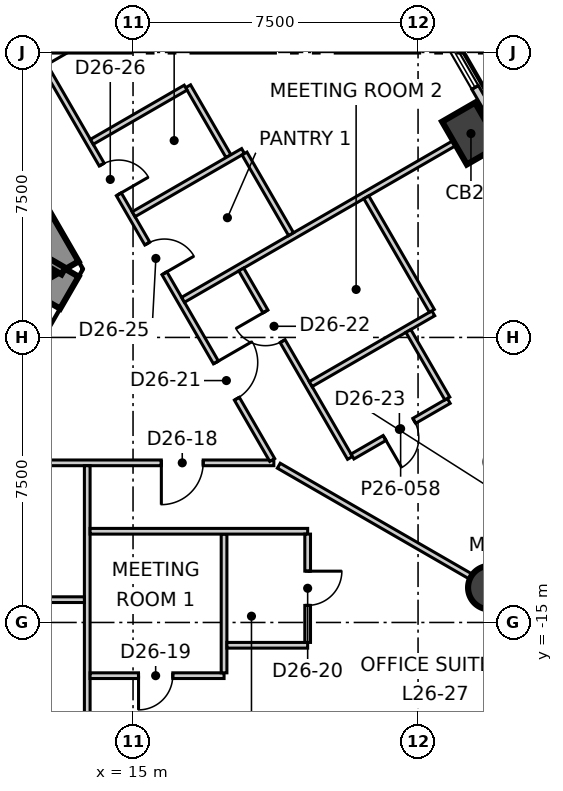
"""IFC4 building model, lengths in metres.
Left out: names, types, materials, properties, quantities, classifications, styles, units other than length and angle.
Written with IfcOpenShell. Run it as: python <this file> out.ifc"""

import sys

from ifc_helpers import new_model, si_unit, direction, frame, frame_2d, origin, origin_2d, place, context, subcontext, project, spatial, polyline, rectangle, circle, outline, extrude, element, fill, save


model = new_model("IFC4")
c1 = context("Model", 3, precision=1e-05, world=origin(), true_north=direction((0.0, 1.0)))
c2 = subcontext(c1, "Body", "Model", "MODEL_VIEW")
j1 = project(units=[si_unit("LENGTHUNIT", "METRE"), si_unit("PLANEANGLEUNIT", "RADIAN")], contexts=[c1])
p1 = place(None, origin())
s1 = spatial("IfcSite", under=j1, at=p1, CompositionType="ELEMENT")
p2 = place(p1, origin())
s2 = spatial("IfcBuilding", under=s1, at=p2, CompositionType="ELEMENT")
p3 = place(p2, frame((0.0, 0.0, 116.3)))
s3 = spatial("IfcBuildingStorey", under=s2, at=p3, CompositionType="ELEMENT", Elevation=116.3)
p4 = place(p3, frame((11.547, -8.6, -0.3), z_axis=(0.0, 0.0, 1.0), x_axis=(0.49987182685, 0.866099391942, 0.0)))
e1 = element("IfcWall", 1, at=p4, inside=s3, PredefinedType="SHEAR", context=c2, shape_type="SweptSolid", body=[
    extrude(outline(polyline([(-0.231, -0.4), (1.674, -0.4), (3.579, -0.4), (3.118, 0.4), (1.674, 0.4), (0.231, 0.4), (-0.231, -0.4)])), origin(), (0.0, 0.0, 1.0), 4.0),
])
p5 = place(p4, frame((0.974, 0.0, 0.3)))
e2 = element("IfcOpeningElement", 2, at=p5, cuts=e1, PredefinedType="OPENING", context=c2, shape_type="SweptSolid", body=[
    extrude(rectangle(XDim=1.4, YDim=2.1, at=frame_2d((0.7, 1.05))), frame((0.0, 0.41, 0.0), z_axis=(0.0, -1.0, 0.0), x_axis=(1.0, 0.0, 0.0)), (0.0, 0.0, 1.0), 0.82),
])
p6 = place(p3, frame((13.221, -5.7, -0.3), z_axis=(0.0, 0.0, 1.0), x_axis=(-0.499995765644, 0.866027848477, 0.0)))
e3 = element("IfcWall", 3, at=p6, inside=s3, PredefinedType="SHEAR", context=c2, shape_type="SweptSolid", body=[
    extrude(outline(polyline([(-0.231, -0.4), (1.732, -0.4), (3.695, -0.4), (5.658, -0.4), (7.621, -0.4), (9.584, -0.4), (11.547, -0.4), (13.51, -0.4), (15.473, -0.4), (17.436, -0.4), (19.399, -0.4), (21.362, -0.4), (23.325, -0.4), (22.863, 0.4), (20.977, 0.4), (19.091, 0.4), (17.205, 0.4), (15.319, 0.4), (13.433, 0.4), (11.547, 0.4), (9.661, 0.4), (7.775, 0.4), (5.889, 0.4), (4.003, 0.4), (2.117, 0.4), (0.231, 0.4), (-0.231, -0.4)])), origin(), (0.0, 0.0, 1.0), 4.0),
])
p7 = place(p6, frame((10.647, 0.0, 0.3)))
e4 = element("IfcOpeningElement", 4, at=p7, cuts=e3, PredefinedType="OPENING", context=c2, shape_type="SweptSolid", body=[
    extrude(rectangle(XDim=1.8, YDim=2.1, at=frame_2d((0.9, 1.05))), frame((0.0, 0.41, 0.0), z_axis=(0.0, -1.0, 0.0), x_axis=(1.0, 0.0, 0.0)), (0.0, 0.0, 1.0), 0.82),
])
p8 = place(p3, frame((23.892, -2.136, -0.3), z_axis=(0.0, 0.0, 1.0), x_axis=(-0.5, 0.866025403784, 0.0)))
e5 = element("IfcColumn", 5, at=p8, inside=s3, PredefinedType="COLUMN", context=c2, shape_type="SweptSolid", body=[
    extrude(rectangle(XDim=1.3, YDim=1.0, at=origin_2d()), origin(), (0.0, 0.0, 1.0), 4.0),
])
p9 = place(p3, frame((24.391, -14.083, -0.3), z_axis=(0.0, 0.0, 1.0), x_axis=(1.0, 0.0, 0.0)))
e6 = element("IfcColumn", 6, at=p9, inside=s3, PredefinedType="COLUMN", context=c2, shape_type="SweptSolid", body=[
    extrude(circle(Radius=0.575, at=origin_2d()), origin(), (0.0, 0.0, 1.0), 4.0),
])
p10 = place(p3, frame((32.048, -14.861, 0.0), z_axis=(0.0, 0.0, 1.0), x_axis=(-0.499996704161, 0.866027306629, 0.0)))
e7 = element("IfcWall", 7, at=p10, inside=s3, PredefinedType="ELEMENTEDWALL", context=c2, shape_type="SweptSolid", body=[
    extrude(rectangle(XDim=57.769, YDim=0.2, at=frame_2d((28.884, 0.0))), origin(), (0.0, 0.0, 1.0), 3.7),
])
p11 = place(p10, frame((2.302, 0.0, 0.9)))
e8 = element("IfcOpeningElement", 8, at=p11, cuts=e7, PredefinedType="OPENING", context=c2, shape_type="SweptSolid", body=[
    extrude(rectangle(XDim=4.9, YDim=2.5, at=frame_2d((2.45, 1.25))), frame((0.0, 0.11, 0.0), z_axis=(0.0, -1.0, 0.0), x_axis=(1.0, 0.0, 0.0)), (0.0, 0.0, 1.0), 0.22),
])
p12 = place(p10, frame((9.199, 0.0, 0.9)))
e9 = element("IfcOpeningElement", 9, at=p12, cuts=e7, PredefinedType="OPENING", context=c2, shape_type="SweptSolid", body=[
    extrude(rectangle(XDim=4.9, YDim=2.5, at=frame_2d((2.45, 1.25))), frame((0.0, 0.11, 0.0), z_axis=(0.0, -1.0, 0.0), x_axis=(1.0, 0.0, 0.0)), (0.0, 0.0, 1.0), 0.22),
])
p13 = place(p10, frame((16.097, 0.0, 0.9)))
e10 = element("IfcOpeningElement", 10, at=p13, cuts=e7, PredefinedType="OPENING", context=c2, shape_type="SweptSolid", body=[
    extrude(rectangle(XDim=4.9, YDim=2.5, at=frame_2d((2.45, 1.25))), frame((0.0, 0.11, 0.0), z_axis=(0.0, -1.0, 0.0), x_axis=(1.0, 0.0, 0.0)), (0.0, 0.0, 1.0), 0.22),
])
p14 = place(p10, frame((22.995, 0.0, 0.9)))
e11 = element("IfcOpeningElement", 11, at=p14, cuts=e7, PredefinedType="OPENING", context=c2, shape_type="SweptSolid", body=[
    extrude(rectangle(XDim=4.9, YDim=2.5, at=frame_2d((2.45, 1.25))), frame((0.0, 0.11, 0.0), z_axis=(0.0, -1.0, 0.0), x_axis=(1.0, 0.0, 0.0)), (0.0, 0.0, 1.0), 0.22),
])
p15 = place(p10, frame((29.893, 0.0, 0.9)))
e12 = element("IfcOpeningElement", 12, at=p15, cuts=e7, PredefinedType="OPENING", context=c2, shape_type="SweptSolid", body=[
    extrude(rectangle(XDim=4.9, YDim=2.5, at=frame_2d((2.45, 1.25))), frame((0.0, 0.11, 0.0), z_axis=(0.0, -1.0, 0.0), x_axis=(1.0, 0.0, 0.0)), (0.0, 0.0, 1.0), 0.22),
])
p16 = place(p10, frame((36.791, 0.0, 0.9)))
e13 = element("IfcOpeningElement", 13, at=p16, cuts=e7, PredefinedType="OPENING", context=c2, shape_type="SweptSolid", body=[
    extrude(rectangle(XDim=4.9, YDim=2.5, at=frame_2d((2.45, 1.25))), frame((0.0, 0.11, 0.0), z_axis=(0.0, -1.0, 0.0), x_axis=(1.0, 0.0, 0.0)), (0.0, 0.0, 1.0), 0.22),
])
p17 = place(p10, frame((43.689, 0.0, 0.9)))
e14 = element("IfcOpeningElement", 14, at=p17, cuts=e7, PredefinedType="OPENING", context=c2, shape_type="SweptSolid", body=[
    extrude(rectangle(XDim=4.9, YDim=2.5, at=frame_2d((2.45, 1.25))), frame((0.0, 0.11, 0.0), z_axis=(0.0, -1.0, 0.0), x_axis=(1.0, 0.0, 0.0)), (0.0, 0.0, 1.0), 0.22),
])
p18 = place(p10, frame((50.587, 0.0, 0.9)))
e15 = element("IfcOpeningElement", 15, at=p18, cuts=e7, PredefinedType="OPENING", context=c2, shape_type="SweptSolid", body=[
    extrude(rectangle(XDim=4.9, YDim=2.5, at=frame_2d((2.45, 1.25))), frame((0.0, 0.11, 0.0), z_axis=(0.0, -1.0, 0.0), x_axis=(1.0, 0.0, 0.0)), (0.0, 0.0, 1.0), 0.22),
])
p19 = place(p3, frame((0.901, -10.8, 0.0), z_axis=(0.0, 0.0, 1.0), x_axis=(1.0, 0.0, 0.0)))
e16 = element("IfcWall", 16, at=p19, inside=s3, PredefinedType="PARTITIONING", context=c2, shape_type="SweptSolid", body=[
    extrude(rectangle(XDim=17.804, YDim=0.15, at=frame_2d((8.902, 0.0))), origin(), (0.0, 0.0, 1.0), 3.7),
])
p20 = place(p19, frame((5.849, 0.0, 0.0)))
e17 = element("IfcOpeningElement", 17, at=p20, cuts=e16, PredefinedType="OPENING", context=c2, shape_type="SweptSolid", body=[
    extrude(rectangle(XDim=1.1, YDim=2.1, at=frame_2d((0.55, 1.05))), frame((0.0, 0.085, 0.0), z_axis=(0.0, -1.0, 0.0), x_axis=(1.0, 0.0, 0.0)), (0.0, 0.0, 1.0), 0.17),
])
p21 = place(p19, frame((14.844, 0.0, 0.0)))
e18 = element("IfcOpeningElement", 18, at=p21, cuts=e16, PredefinedType="OPENING", context=c2, shape_type="SweptSolid", body=[
    extrude(rectangle(XDim=1.1, YDim=2.1, at=frame_2d((0.55, 1.05))), frame((0.0, 0.085, 0.0), z_axis=(0.0, -1.0, 0.0), x_axis=(1.0, 0.0, 0.0)), (0.0, 0.0, 1.0), 0.17),
])
p22 = place(p3, frame((9.803, 4.62, 0.0), z_axis=(0.0, 0.0, 1.0), x_axis=(0.500023004316, -0.866012121829, 0.0)))
e19 = element("IfcWall", 19, at=p22, inside=s3, PredefinedType="PARTITIONING", context=c2, shape_type="SweptSolid", body=[
    extrude(rectangle(XDim=17.719, YDim=0.15, at=frame_2d((8.86, 0.0))), origin(), (0.0, 0.0, 1.0), 3.7),
])
p23 = place(p22, frame((14.756, 0.0, 0.0)))
e20 = element("IfcOpeningElement", 20, at=p23, cuts=e19, PredefinedType="OPENING", context=c2, shape_type="SweptSolid", body=[
    extrude(rectangle(XDim=1.1, YDim=2.1, at=frame_2d((0.55, 1.05))), frame((0.0, 0.085, 0.0), z_axis=(0.0, -1.0, 0.0), x_axis=(1.0, 0.0, 0.0)), (0.0, 0.0, 1.0), 0.17),
])
p24 = place(p22, frame((4.645, 0.0, 0.0)))
e21 = element("IfcOpeningElement", 21, at=p24, cuts=e19, PredefinedType="OPENING", context=c2, shape_type="SweptSolid", body=[
    extrude(rectangle(XDim=1.1, YDim=2.1, at=frame_2d((0.55, 1.05))), frame((0.0, 0.085, 0.0), z_axis=(0.0, -1.0, 0.0), x_axis=(1.0, 0.0, 0.0)), (0.0, 0.0, 1.0), 0.17),
])
p25 = place(p22, frame((11.145, 0.0, 0.0)))
e22 = element("IfcOpeningElement", 22, at=p25, cuts=e19, PredefinedType="OPENING", context=c2, shape_type="SweptSolid", body=[
    extrude(rectangle(XDim=0.9, YDim=2.1, at=frame_2d((0.45, 1.05))), frame((0.0, 0.085, 0.0), z_axis=(0.0, -1.0, 0.0), x_axis=(1.0, 0.0, 0.0)), (0.0, 0.0, 1.0), 0.17),
])
p26 = place(p22, frame((8.745, 0.0, 0.0)))
e23 = element("IfcOpeningElement", 23, at=p26, cuts=e19, PredefinedType="OPENING", context=c2, shape_type="SweptSolid", body=[
    extrude(rectangle(XDim=0.9, YDim=2.1, at=frame_2d((0.45, 1.05))), frame((0.0, 0.085, 0.0), z_axis=(0.0, -1.0, 0.0), x_axis=(1.0, 0.0, 0.0)), (0.0, 0.0, 1.0), 0.17),
])
p27 = place(p3, frame((13.795, -20.244, 0.0), z_axis=(0.0, 0.0, 1.0), x_axis=(0.0, 1.0, 0.0)))
e24 = element("IfcWall", 24, at=p27, inside=s3, PredefinedType="PARTITIONING", context=c2, shape_type="SweptSolid", body=[
    extrude(rectangle(XDim=9.369, YDim=0.15, at=frame_2d((4.685, 0.0))), origin(), (0.0, 0.0, 1.0), 3.7),
])
p28 = place(p3, frame((16.449, -0.891, 0.0), z_axis=(0.0, 0.0, 1.0), x_axis=(0.500266112279, -0.865871709265, 0.0)))
e25 = element("IfcWall", 25, at=p28, inside=s3, PredefinedType="PARTITIONING", context=c2, shape_type="SweptSolid", body=[
    extrude(rectangle(XDim=2.125, YDim=0.15, at=frame_2d((1.062, 0.0))), origin(), (0.0, 0.0, 1.0), 3.7),
])
p29 = place(p3, frame((13.916, -2.353, 0.0), z_axis=(0.0, 0.0, 1.0), x_axis=(0.866004402611, 0.500036373335, 0.0)))
e26 = element("IfcWall", 26, at=p29, inside=s3, PredefinedType="PARTITIONING", context=c2, shape_type="SweptSolid", body=[
    extrude(rectangle(XDim=2.85, YDim=0.15, at=frame_2d((1.425, 0.0))), origin(), (0.0, 0.0, 1.0), 3.7),
])
p30 = place(p3, frame((15.016, -4.258, 0.0), z_axis=(0.0, 0.0, 1.0), x_axis=(0.866029041019, 0.499993700073, 0.0)))
e27 = element("IfcWall", 27, at=p30, inside=s3, PredefinedType="PARTITIONING", context=c2, shape_type="SweptSolid", body=[
    extrude(rectangle(XDim=3.324, YDim=0.15, at=frame_2d((1.662, 0.0))), origin(), (0.0, 0.0, 1.0), 3.7),
])
p31 = place(p3, frame((16.316, -6.51, 0.0), z_axis=(0.0, 0.0, 1.0), x_axis=(0.866024577697, 0.500001430823, 0.0)))
e28 = element("IfcWall", 28, at=p31, inside=s3, PredefinedType="PARTITIONING", context=c2, shape_type="SweptSolid", body=[
    extrude(rectangle(XDim=9.368, YDim=0.15, at=frame_2d((4.684, 0.0))), origin(), (0.0, 0.0, 1.0), 3.7),
])
p32 = place(p3, frame((17.933, -2.661, 0.0), z_axis=(0.0, 0.0, 1.0), x_axis=(0.499900713578, -0.866082719239, 0.0)))
e29 = element("IfcWall", 29, at=p32, inside=s3, PredefinedType="PARTITIONING", context=c2, shape_type="SweptSolid", body=[
    extrude(rectangle(XDim=2.45, YDim=0.15, at=frame_2d((1.225, 0.0))), origin(), (0.0, 0.0, 1.0), 3.7),
])
p33 = place(p3, frame((18.835, -10.875, 0.0), z_axis=(0.0, 0.0, 1.0), x_axis=(0.866009336022, -0.500027829149, 0.0)))
e30 = element("IfcWall", 30, at=p33, inside=s3, PredefinedType="PARTITIONING", context=c2, shape_type="SweptSolid", body=[
    extrude(rectangle(XDim=7.036, YDim=0.15, at=frame_2d((3.518, 0.0))), origin(), (0.0, 0.0, 1.0), 3.15),
])
p34 = place(p3, frame((0.975, -14.4, 0.0), z_axis=(0.0, 0.0, 1.0), x_axis=(1.0, 0.0, 0.0)))
e31 = element("IfcWall", 31, at=p34, inside=s3, PredefinedType="PARTITIONING", context=c2, shape_type="SweptSolid", body=[
    extrude(rectangle(XDim=12.745, YDim=0.15, at=frame_2d((6.373, 0.0))), origin(), (0.0, 0.0, 1.0), 3.7),
])
p35 = place(p34, frame((5.875, 0.0, 0.0)))
e32 = element("IfcOpeningElement", 32, at=p35, cuts=e31, PredefinedType="OPENING", context=c2, shape_type="SweptSolid", body=[
    extrude(rectangle(XDim=1.0, YDim=2.1, at=frame_2d((0.5, 1.05))), frame((0.0, 0.085, 0.0), z_axis=(0.0, -1.0, 0.0), x_axis=(1.0, 0.0, 0.0)), (0.0, 0.0, 1.0), 0.17),
])
p36 = place(p3, frame((17.847, -5.712, 0.0), z_axis=(0.0, 0.0, 1.0), x_axis=(0.500069422629, -0.865985318901, 0.0)))
e33 = element("IfcWall", 33, at=p36, inside=s3, PredefinedType="PARTITIONING", context=c2, shape_type="SweptSolid", body=[
    extrude(rectangle(XDim=5.725, YDim=0.15, at=frame_2d((2.863, 0.0))), origin(), (0.0, 0.0, 1.0), 3.7),
])
p37 = place(p36, frame((1.276, 0.0, 0.0)))
e34 = element("IfcOpeningElement", 34, at=p37, cuts=e33, PredefinedType="OPENING", context=c2, shape_type="SweptSolid", body=[
    extrude(rectangle(XDim=0.9, YDim=2.1, at=frame_2d((0.45, 1.05))), frame((0.0, 0.085, 0.0), z_axis=(0.0, -1.0, 0.0), x_axis=(1.0, 0.0, 0.0)), (0.0, 0.0, 1.0), 0.17),
])
p38 = place(p3, frame((13.87, -16.4, 0.0), z_axis=(0.0, 0.0, 1.0), x_axis=(1.0, 0.0, 0.0)))
e35 = element("IfcWall", 35, at=p38, inside=s3, PredefinedType="PARTITIONING", context=c2, shape_type="SweptSolid", body=[
    extrude(rectangle(XDim=3.525, YDim=0.15, at=frame_2d((1.762, 0.0))), origin(), (0.0, 0.0, 1.0), 3.7),
])
p39 = place(p38, frame((1.275, 0.0, 0.0)))
e36 = element("IfcOpeningElement", 36, at=p39, cuts=e35, PredefinedType="OPENING", context=c2, shape_type="SweptSolid", body=[
    extrude(rectangle(XDim=0.9, YDim=2.1, at=frame_2d((0.45, 1.05))), frame((0.0, 0.085, 0.0), z_axis=(0.0, -1.0, 0.0), x_axis=(1.0, 0.0, 0.0)), (0.0, 0.0, 1.0), 0.17),
])
p40 = place(p3, frame((17.395, -16.325, 0.0), z_axis=(0.0, 0.0, 1.0), x_axis=(0.0, 1.0, 0.0)))
e37 = element("IfcWall", 37, at=p40, inside=s3, PredefinedType="PARTITIONING", context=c2, shape_type="SweptSolid", body=[
    extrude(rectangle(XDim=3.65, YDim=0.15, at=frame_2d((1.825, 0.0))), origin(), (0.0, 0.0, 1.0), 3.7),
])
p41 = place(p3, frame((13.87, -12.6, 0.0), z_axis=(0.0, 0.0, 1.0), x_axis=(1.0, 0.0, 0.0)))
e38 = element("IfcWall", 38, at=p41, inside=s3, PredefinedType="PARTITIONING", context=c2, shape_type="SweptSolid", body=[
    extrude(rectangle(XDim=5.725, YDim=0.15, at=frame_2d((2.862, 0.0))), origin(), (0.0, 0.0, 1.0), 3.7),
])
p42 = place(p3, frame((17.47, -15.6, 0.0), z_axis=(0.0, 0.0, 1.0), x_axis=(1.0, 0.0, 0.0)))
e39 = element("IfcWall", 39, at=p42, inside=s3, PredefinedType="PARTITIONING", context=c2, shape_type="SweptSolid", body=[
    extrude(rectangle(XDim=2.125, YDim=0.15, at=frame_2d((1.062, 0.0))), origin(), (0.0, 0.0, 1.0), 3.7),
])
p43 = place(p3, frame((19.595, -15.525, 0.0), z_axis=(0.0, 0.0, 1.0), x_axis=(0.0, 1.0, 0.0)))
e40 = element("IfcWall", 40, at=p43, inside=s3, PredefinedType="PARTITIONING", context=c2, shape_type="SweptSolid", body=[
    extrude(rectangle(XDim=2.85, YDim=0.15, at=frame_2d((1.425, 0.0))), origin(), (0.0, 0.0, 1.0), 3.7),
])
p44 = place(p43, frame((0.975, 0.0, 0.0)))
e41 = element("IfcOpeningElement", 41, at=p44, cuts=e40, PredefinedType="OPENING", context=c2, shape_type="SweptSolid", body=[
    extrude(rectangle(XDim=0.9, YDim=2.1, at=frame_2d((0.45, 1.05))), frame((0.0, 0.085, 0.0), z_axis=(0.0, -1.0, 0.0), x_axis=(1.0, 0.0, 0.0)), (0.0, 0.0, 1.0), 0.17),
])
p45 = place(p3, frame((19.675, -8.728, 0.0), z_axis=(0.0, 0.0, 1.0), x_axis=(0.865955274182, 0.500121448367, 0.0)))
e42 = element("IfcWall", 42, at=p45, inside=s3, PredefinedType="PARTITIONING", context=c2, shape_type="SweptSolid", body=[
    extrude(rectangle(XDim=3.725, YDim=0.15, at=frame_2d((1.863, 0.0))), origin(), (0.0, 0.0, 1.0), 3.7),
])
p46 = place(p3, frame((21.138, -3.812, 0.0), z_axis=(0.0, 0.0, 1.0), x_axis=(0.49998991961, -0.866031223622, 0.0)))
e43 = element("IfcWall", 43, at=p46, inside=s3, PredefinedType="PARTITIONING", context=c2, shape_type="SweptSolid", body=[
    extrude(rectangle(XDim=3.45, YDim=0.15, at=frame_2d((1.725, 0.0))), origin(), (0.0, 0.0, 1.0), 3.7),
])
p47 = place(p3, frame((20.775, -10.633, 0.0), z_axis=(0.0, 0.0, 1.0), x_axis=(0.865938168999, 0.50015106465, 0.0)))
e44 = element("IfcWall", 44, at=p47, inside=s3, PredefinedType="PARTITIONING", context=c2, shape_type="SweptSolid", body=[
    extrude(rectangle(XDim=2.925, YDim=0.15, at=frame_2d((1.463, 0.0))), origin(), (0.0, 0.0, 1.0), 3.7),
])
p48 = place(p47, frame((0.975, 0.0, 0.0)))
e45 = element("IfcOpeningElement", 45, at=p48, cuts=e44, PredefinedType="OPENING", context=c2, shape_type="SweptSolid", body=[
    extrude(rectangle(XDim=0.9, YDim=2.1, at=frame_2d((0.45, 1.05))), frame((0.0, 0.085, 0.0), z_axis=(0.0, -1.0, 0.0), x_axis=(1.0, 0.0, 0.0)), (0.0, 0.0, 1.0), 0.17),
])
p49 = place(p3, frame((22.245, -7.33, 0.0), z_axis=(0.0, 0.0, 1.0), x_axis=(0.499853014394, -0.866110249334, 0.0)))
e46 = element("IfcWall", 46, at=p49, inside=s3, PredefinedType="PARTITIONING", context=c2, shape_type="SweptSolid", body=[
    extrude(rectangle(XDim=2.05, YDim=0.15, at=frame_2d((1.025, 0.0))), origin(), (0.0, 0.0, 1.0), 3.7),
])
p50 = place(p3, frame((6.529, -1.922, 0.0), z_axis=(0.0, 0.0, 1.0), x_axis=(0.866060938598, -0.499938446846, 0.0)))
e47 = element("IfcWall", 47, at=p50, inside=s3, PredefinedType="SOLIDWALL", context=c2, shape_type="SweptSolid", body=[
    extrude(rectangle(XDim=7.665, YDim=0.2, at=frame_2d((3.832, 0.0))), origin(), (0.0, 0.0, 1.0), 3.7),
])
p51 = place(p13, origin())
e48 = element("IfcWindow", 48, at=p51, inside=s3, PartitioningType="SINGLE_PANEL", PredefinedType="WINDOW", context=c2, shape_type="SweptSolid", body=[
    extrude(rectangle(XDim=4.9, YDim=2.5, at=frame_2d((2.45, 1.25))), frame((0.0, 0.03, 0.0), z_axis=(0.0, -1.0, 0.0), x_axis=(1.0, 0.0, 0.0)), (0.0, 0.0, 1.0), 0.06),
])
fill(e10, e48)
p52 = place(p21, origin())
e49 = element("IfcDoor", 49, at=p52, inside=s3, OperationType="SINGLE_SWING_LEFT", PredefinedType="DOOR", context=c2, shape_type="SweptSolid", body=[
    extrude(rectangle(XDim=1.1, YDim=2.1, at=frame_2d((0.55, 1.05))), frame((0.0, 0.025, 0.0), z_axis=(0.0, -1.0, 0.0), x_axis=(1.0, 0.0, 0.0)), (0.0, 0.0, 1.0), 0.05),
])
fill(e18, e49)
p53 = place(p39, origin())
e50 = element("IfcDoor", 50, at=p53, inside=s3, OperationType="SINGLE_SWING_LEFT", PredefinedType="DOOR", context=c2, shape_type="SweptSolid", body=[
    extrude(rectangle(XDim=0.9, YDim=2.1, at=frame_2d((0.45, 1.05))), frame((0.0, 0.025, 0.0), z_axis=(0.0, -1.0, 0.0), x_axis=(1.0, 0.0, 0.0)), (0.0, 0.0, 1.0), 0.05),
])
fill(e36, e50)
p54 = place(p44, origin())
e51 = element("IfcDoor", 51, at=p54, inside=s3, OperationType="SINGLE_SWING_RIGHT", PredefinedType="DOOR", context=c2, shape_type="SweptSolid", body=[
    extrude(rectangle(XDim=0.9, YDim=2.1, at=frame_2d((0.45, 1.05))), frame((0.0, 0.025, 0.0), z_axis=(0.0, -1.0, 0.0), x_axis=(1.0, 0.0, 0.0)), (0.0, 0.0, 1.0), 0.05),
])
fill(e41, e51)
p55 = place(p23, origin())
e52 = element("IfcDoor", 52, at=p55, inside=s3, OperationType="SINGLE_SWING_RIGHT", PredefinedType="DOOR", context=c2, shape_type="SweptSolid", body=[
    extrude(rectangle(XDim=1.1, YDim=2.1, at=frame_2d((0.55, 1.05))), frame((0.0, 0.025, 0.0), z_axis=(0.0, -1.0, 0.0), x_axis=(1.0, 0.0, 0.0)), (0.0, 0.0, 1.0), 0.05),
])
fill(e20, e52)
p56 = place(p37, origin())
e53 = element("IfcDoor", 53, at=p56, inside=s3, OperationType="SINGLE_SWING_LEFT", PredefinedType="DOOR", context=c2, shape_type="SweptSolid", body=[
    extrude(rectangle(XDim=0.9, YDim=2.1, at=frame_2d((0.45, 1.05))), frame((0.0, 0.025, 0.0), z_axis=(0.0, -1.0, 0.0), x_axis=(1.0, 0.0, 0.0)), (0.0, 0.0, 1.0), 0.05),
])
fill(e34, e53)
p57 = place(p48, origin())
e54 = element("IfcDoor", 54, at=p57, inside=s3, OperationType="SINGLE_SWING_LEFT", PredefinedType="DOOR", context=c2, shape_type="SweptSolid", body=[
    extrude(rectangle(XDim=0.9, YDim=2.1, at=frame_2d((0.45, 1.05))), frame((0.0, 0.025, 0.0), z_axis=(0.0, -1.0, 0.0), x_axis=(1.0, 0.0, 0.0)), (0.0, 0.0, 1.0), 0.05),
])
fill(e45, e54)
p58 = place(p25, origin())
e55 = element("IfcDoor", 55, at=p58, inside=s3, OperationType="SINGLE_SWING_LEFT", PredefinedType="DOOR", context=c2, shape_type="SweptSolid", body=[
    extrude(rectangle(XDim=0.9, YDim=2.1, at=frame_2d((0.45, 1.05))), frame((0.0, 0.025, 0.0), z_axis=(0.0, -1.0, 0.0), x_axis=(1.0, 0.0, 0.0)), (0.0, 0.0, 1.0), 0.05),
])
fill(e22, e55)
p59 = place(p26, origin())
e56 = element("IfcDoor", 56, at=p59, inside=s3, OperationType="SINGLE_SWING_LEFT", PredefinedType="DOOR", context=c2, shape_type="SweptSolid", body=[
    extrude(rectangle(XDim=0.9, YDim=2.1, at=frame_2d((0.45, 1.05))), frame((0.0, 0.025, 0.0), z_axis=(0.0, -1.0, 0.0), x_axis=(1.0, 0.0, 0.0)), (0.0, 0.0, 1.0), 0.05),
])
fill(e23, e56)
save(model, sys.argv[1])
